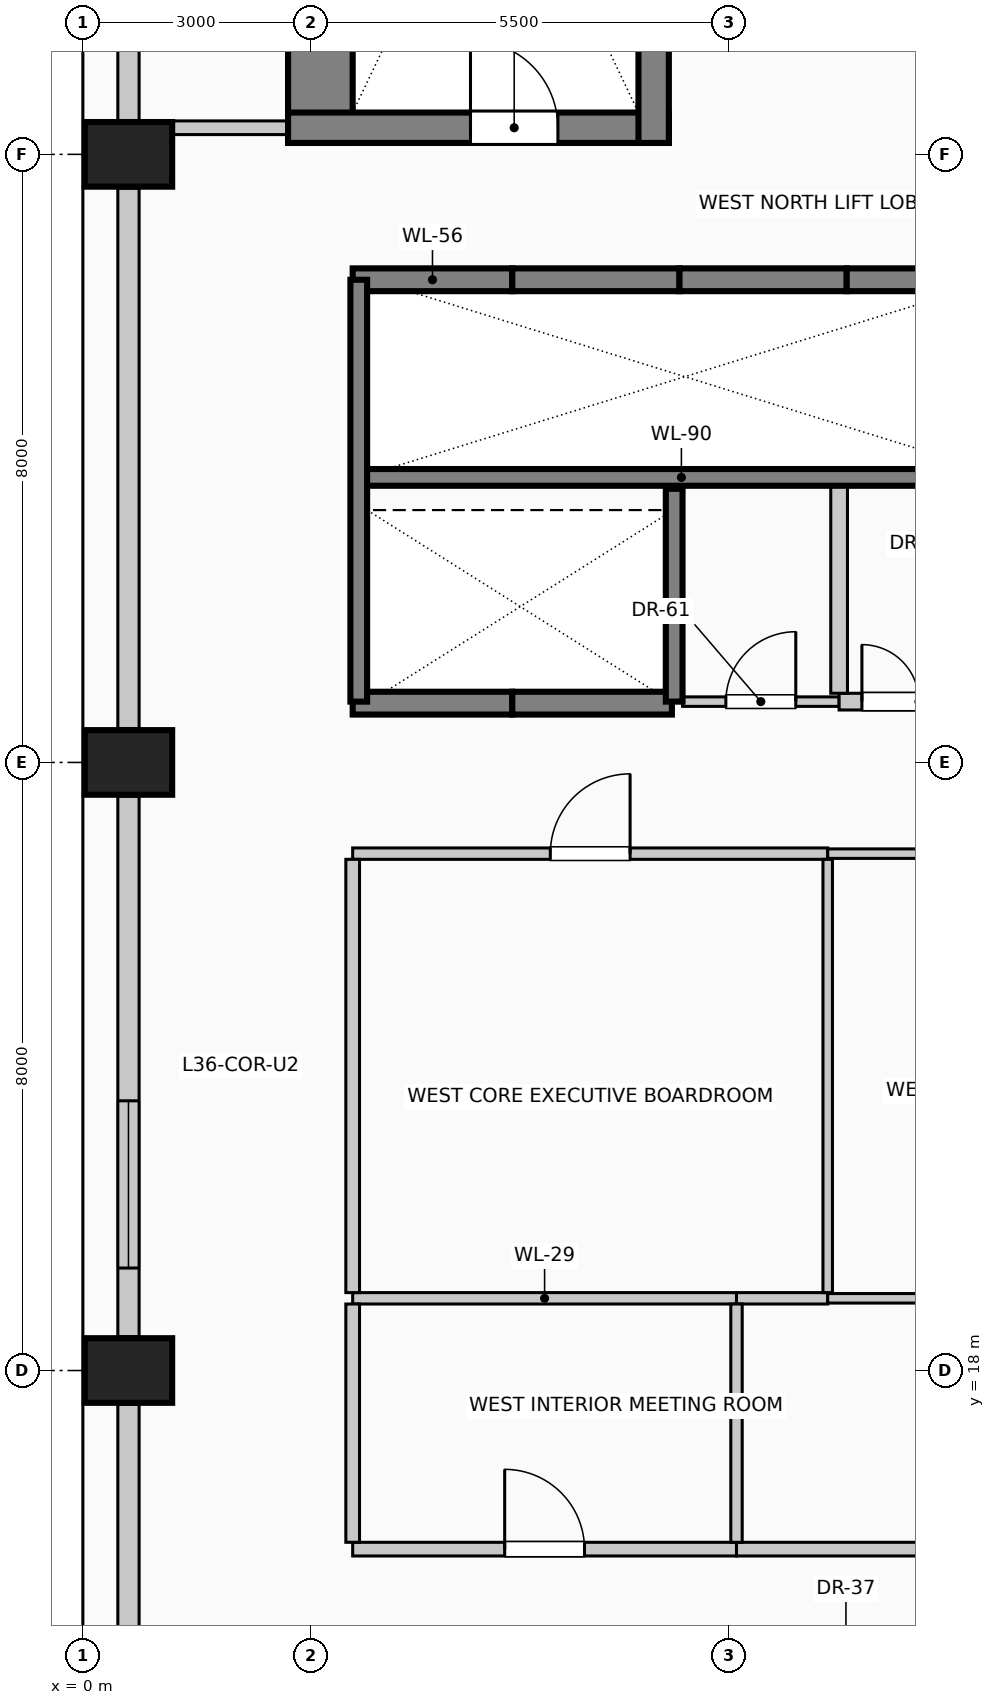
"""IFC4 building model, lengths in metres.
Left out: names, types, materials, properties, quantities, classifications, styles, units other than length and angle.
Written with IfcOpenShell. Run it as: python <this file> out.ifc"""

import sys

from ifc_helpers import new_model, si_unit, direction, frame, frame_2d, origin, origin_2d, place, context, subcontext, project, spatial, rectangle, extrude, element, fill, save


model = new_model("IFC4")
c1 = context("Model", 3, precision=1e-05, world=origin(), true_north=direction((0.0, 1.0)))
c2 = subcontext(c1, "Body", "Model", "MODEL_VIEW")
j1 = project(units=[si_unit("LENGTHUNIT", "METRE"), si_unit("PLANEANGLEUNIT", "RADIAN")], contexts=[c1])
p1 = place(None, origin())
s1 = spatial("IfcSite", under=j1, at=p1, CompositionType="ELEMENT")
p2 = place(p1, origin())
s2 = spatial("IfcBuilding", under=s1, at=p2, CompositionType="ELEMENT")
p3 = place(p2, frame((0.0, 0.0, 148.6)))
s3 = spatial("IfcBuildingStorey", under=s2, at=p3, CompositionType="ELEMENT", Elevation=148.6)
p4 = place(p3, frame((3.125, 34.15, 0.0), z_axis=(0.0, 0.0, 1.0), x_axis=(0.0, 1.0, 0.0)))
e1 = element("IfcWall", 1, at=p4, inside=s3, PredefinedType="SHEAR", context=c2, shape_type="SweptSolid", body=[
    extrude(rectangle(XDim=9.13, YDim=0.85, at=frame_2d((4.565, 0.0))), origin(), (0.0, 0.0, 1.0), 4.0),
])
p5 = place(p3, frame((2.7, 34.35, 0.0), z_axis=(0.0, 0.0, 1.0), x_axis=(1.0, 0.0, 0.0)))
e2 = element("IfcWall", 2, at=p5, inside=s3, PredefinedType="SHEAR", context=c2, shape_type="SweptSolid", body=[
    extrude(rectangle(XDim=5.01, YDim=0.4, at=frame_2d((2.505, 0.0))), origin(), (0.0, 0.0, 1.0), 4.0),
])
p6 = place(p5, frame((2.4, 0.0, 0.0)))
e3 = element("IfcOpeningElement", 3, at=p6, cuts=e2, PredefinedType="OPENING", context=c2, shape_type="SweptSolid", body=[
    extrude(rectangle(XDim=1.15, YDim=2.2, at=frame_2d((0.575, 1.1))), frame((0.0, 0.21, 0.0), z_axis=(0.0, -1.0, 0.0), x_axis=(1.0, 0.0, 0.0)), (0.0, 0.0, 1.0), 0.42),
])
p7 = place(p3, frame((7.51, 34.15, 0.0), z_axis=(0.0, 0.0, 1.0), x_axis=(0.0, 1.0, 0.0)))
e4 = element("IfcWall", 4, at=p7, inside=s3, PredefinedType="SHEAR", context=c2, shape_type="SweptSolid", body=[
    extrude(rectangle(XDim=9.13, YDim=0.4, at=frame_2d((4.565, 0.0))), origin(), (0.0, 0.0, 1.0), 4.0),
])
for number, where, z_axis, x_axis in (
    (5, (0.6, 18.0, 0.0), (0.0, 0.0, 1.0), (0.0, 1.0, 0.0)),
    (6, (0.6, 26.0, 0.0), (0.0, 0.0, 1.0), (0.0, 1.0, 0.0)),
    (7, (0.6, 34.0, 0.0), (0.0, 0.0, 1.0), (0.0, 1.0, 0.0)),
):
    element("IfcColumn", number, at=place(p3, frame(where, z_axis=z_axis, x_axis=x_axis)), inside=s3, PredefinedType="COLUMN", context=c2, shape_type="SweptSolid", body=[
        extrude(rectangle(XDim=0.85, YDim=1.15, at=origin_2d()), origin(), (0.0, 0.0, 1.0), 4.0),
    ])
p8 = place(p3, frame((0.6, 10.445, 0.0), z_axis=(0.0, 0.0, 1.0), x_axis=(0.0, 1.0, 0.0)))
e8 = element("IfcWall", 8, at=p8, inside=s3, PredefinedType="SOLIDWALL", context=c2, shape_type="SweptSolid", body=[
    extrude(rectangle(XDim=7.11, YDim=0.28, at=frame_2d((3.555, 0.0))), origin(), (0.0, 0.0, 1.0), 2.875),
])
p9 = place(p3, frame((0.6, 18.445, 0.0), z_axis=(0.0, 0.0, 1.0), x_axis=(0.0, 1.0, 0.0)))
e9 = element("IfcWall", 9, at=p9, inside=s3, PredefinedType="SOLIDWALL", context=c2, shape_type="SweptSolid", body=[
    extrude(rectangle(XDim=7.11, YDim=0.28, at=frame_2d((3.555, 0.0))), origin(), (0.0, 0.0, 1.0), 2.875),
])
p10 = place(p9, frame((0.903, 0.0, 0.5)))
e10 = element("IfcOpeningElement", 10, at=p10, cuts=e9, PredefinedType="OPENING", context=c2, shape_type="SweptSolid", body=[
    extrude(rectangle(XDim=2.2, YDim=1.95, at=frame_2d((1.1, 0.975))), frame((0.0, 0.15, 0.0), z_axis=(0.0, -1.0, 0.0), x_axis=(1.0, 0.0, 0.0)), (0.0, 0.0, 1.0), 0.3),
])
p11 = place(p3, frame((0.6, 26.445, 0.0), z_axis=(0.0, 0.0, 1.0), x_axis=(0.0, 1.0, 0.0)))
e11 = element("IfcWall", 11, at=p11, inside=s3, PredefinedType="SOLIDWALL", context=c2, shape_type="SweptSolid", body=[
    extrude(rectangle(XDim=7.11, YDim=0.28, at=frame_2d((3.555, 0.0))), origin(), (0.0, 0.0, 1.0), 2.875),
])
p12 = place(p3, frame((0.6, 34.445, 0.0), z_axis=(0.0, 0.0, 1.0), x_axis=(0.0, 1.0, 0.0)))
e12 = element("IfcWall", 12, at=p12, inside=s3, PredefinedType="SOLIDWALL", context=c2, shape_type="SweptSolid", body=[
    extrude(rectangle(XDim=7.51, YDim=0.28, at=frame_2d((3.755, 0.0))), origin(), (0.0, 0.0, 1.0), 2.875),
])
p13 = place(p3, frame((3.55, 32.35, 0.0), z_axis=(0.0, 0.0, 1.0), x_axis=(1.0, 0.0, 0.0)))
e13 = element("IfcWall", 13, at=p13, inside=s3, PredefinedType="SOLIDWALL", context=c2, shape_type="SweptSolid", body=[
    extrude(rectangle(XDim=2.1, YDim=0.3, at=frame_2d((1.05, 0.0))), origin(), (0.0, 0.0, 1.0), 4.0),
])
p14 = place(p3, frame((5.65, 32.35, 0.0), z_axis=(0.0, 0.0, 1.0), x_axis=(1.0, 0.0, 0.0)))
e14 = element("IfcWall", 14, at=p14, inside=s3, PredefinedType="SOLIDWALL", context=c2, shape_type="SweptSolid", body=[
    extrude(rectangle(XDim=2.2, YDim=0.3, at=frame_2d((1.1, 0.0))), origin(), (0.0, 0.0, 1.0), 4.0),
])
p15 = place(p3, frame((7.85, 32.35, 0.0), z_axis=(0.0, 0.0, 1.0), x_axis=(1.0, 0.0, 0.0)))
e15 = element("IfcWall", 15, at=p15, inside=s3, PredefinedType="SOLIDWALL", context=c2, shape_type="SweptSolid", body=[
    extrude(rectangle(XDim=2.2, YDim=0.3, at=frame_2d((1.1, 0.0))), origin(), (0.0, 0.0, 1.0), 4.0),
])
p16 = place(p3, frame((10.05, 32.35, 0.0), z_axis=(0.0, 0.0, 1.0), x_axis=(1.0, 0.0, 0.0)))
e16 = element("IfcWall", 16, at=p16, inside=s3, PredefinedType="SOLIDWALL", context=c2, shape_type="SweptSolid", body=[
    extrude(rectangle(XDim=2.15, YDim=0.3, at=frame_2d((1.075, 0.0))), origin(), (0.0, 0.0, 1.0), 4.0),
])
p17 = place(p3, frame((5.65, 26.78, 0.0), z_axis=(0.0, 0.0, 1.0), x_axis=(-1.0, 0.0, 0.0)))
e17 = element("IfcWall", 17, at=p17, inside=s3, PredefinedType="SOLIDWALL", context=c2, shape_type="SweptSolid", body=[
    extrude(rectangle(XDim=2.1, YDim=0.3, at=frame_2d((1.05, 0.0))), origin(), (0.0, 0.0, 1.0), 4.0),
])
p18 = place(p3, frame((7.75, 26.78, 0.0), z_axis=(0.0, 0.0, 1.0), x_axis=(-1.0, 0.0, 0.0)))
e18 = element("IfcWall", 18, at=p18, inside=s3, PredefinedType="SOLIDWALL", context=c2, shape_type="SweptSolid", body=[
    extrude(rectangle(XDim=2.1, YDim=0.3, at=frame_2d((1.05, 0.0))), origin(), (0.0, 0.0, 1.0), 4.0),
])
p19 = place(p3, frame((3.55, 29.75, 0.0), z_axis=(0.0, 0.0, 1.0), x_axis=(1.0, 0.0, 0.0)))
e19 = element("IfcWall", 19, at=p19, inside=s3, PredefinedType="SOLIDWALL", context=c2, shape_type="SweptSolid", body=[
    extrude(rectangle(XDim=8.65, YDim=0.22, at=frame_2d((4.325, 0.0))), origin(), (0.0, 0.0, 1.0), 4.0),
])
p20 = place(p3, frame((3.63, 26.8, 0.0), z_axis=(0.0, 0.0, 1.0), x_axis=(0.0, 1.0, 0.0)))
e20 = element("IfcWall", 20, at=p20, inside=s3, PredefinedType="SOLIDWALL", context=c2, shape_type="SweptSolid", body=[
    extrude(rectangle(XDim=5.55, YDim=0.22, at=frame_2d((2.775, 0.0))), origin(), (0.0, 0.0, 1.0), 4.0),
])
p21 = place(p3, frame((7.78, 26.8, 0.0), z_axis=(0.0, 0.0, 1.0), x_axis=(0.0, 1.0, 0.0)))
e21 = element("IfcWall", 21, at=p21, inside=s3, PredefinedType="SOLIDWALL", context=c2, shape_type="SweptSolid", body=[
    extrude(rectangle(XDim=2.8, YDim=0.22, at=frame_2d((1.4, 0.0))), origin(), (0.0, 0.0, 1.0), 4.0),
])
p22 = place(p3, frame((3.55, 15.65, 0.0), z_axis=(0.0, 0.0, 1.0), x_axis=(1.0, 0.0, 0.0)))
e22 = element("IfcWall", 22, at=p22, inside=s3, PredefinedType="PARTITIONING", context=c2, shape_type="SweptSolid", body=[
    extrude(rectangle(XDim=5.05, YDim=0.18, at=frame_2d((2.525, 0.0))), origin(), (0.0, 0.0, 1.0), 3.725),
])
p23 = place(p22, frame((2.0, 0.0, 0.0)))
e23 = element("IfcOpeningElement", 23, at=p23, cuts=e22, PredefinedType="OPENING", context=c2, shape_type="SweptSolid", body=[
    extrude(rectangle(XDim=1.05, YDim=2.15, at=frame_2d((0.525, 1.075))), frame((0.0, 0.1, 0.0), z_axis=(0.0, -1.0, 0.0), x_axis=(1.0, 0.0, 0.0)), (0.0, 0.0, 1.0), 0.2),
])
p24 = place(p3, frame((8.6, 15.65, 0.0), z_axis=(0.0, 0.0, 1.0), x_axis=(1.0, 0.0, 0.0)))
e24 = element("IfcWall", 24, at=p24, inside=s3, PredefinedType="PARTITIONING", context=c2, shape_type="SweptSolid", body=[
    extrude(rectangle(XDim=7.25, YDim=0.18, at=frame_2d((3.625, 0.0))), origin(), (0.0, 0.0, 1.0), 3.725),
])
p25 = place(p24, frame((3.15, 0.0, 0.0)))
e25 = element("IfcOpeningElement", 25, at=p25, cuts=e24, PredefinedType="OPENING", context=c2, shape_type="SweptSolid", body=[
    extrude(rectangle(XDim=0.95, YDim=2.15, at=frame_2d((0.475, 1.075))), frame((0.0, 0.1, 0.0), z_axis=(0.0, -1.0, 0.0), x_axis=(1.0, 0.0, 0.0)), (0.0, 0.0, 1.0), 0.2),
])
p26 = place(p3, frame((3.55, 18.95, 0.0), z_axis=(0.0, 0.0, 1.0), x_axis=(1.0, 0.0, 0.0)))
e26 = element("IfcWall", 26, at=p26, inside=s3, PredefinedType="PARTITIONING", context=c2, shape_type="SweptSolid", body=[
    extrude(rectangle(XDim=5.05, YDim=0.15, at=frame_2d((2.525, 0.0))), origin(), (0.0, 0.0, 1.0), 3.725),
])
p27 = place(p3, frame((8.6, 18.95, 0.0), z_axis=(0.0, 0.0, 1.0), x_axis=(1.0, 0.0, 0.0)))
e27 = element("IfcWall", 27, at=p27, inside=s3, PredefinedType="PARTITIONING", context=c2, shape_type="SweptSolid", body=[
    extrude(rectangle(XDim=1.2, YDim=0.15, at=frame_2d((0.6, 0.0))), origin(), (0.0, 0.0, 1.0), 3.725),
])
p28 = place(p3, frame((9.8, 18.95, 0.0), z_axis=(0.0, 0.0, 1.0), x_axis=(1.0, 0.0, 0.0)))
e28 = element("IfcWall", 28, at=p28, inside=s3, PredefinedType="PARTITIONING", context=c2, shape_type="SweptSolid", body=[
    extrude(rectangle(XDim=6.05, YDim=0.125, at=frame_2d((3.025, 0.0))), origin(), (0.0, 0.0, 1.0), 3.725),
])
p29 = place(p3, frame((3.55, 24.8, 0.0), z_axis=(0.0, 0.0, 1.0), x_axis=(1.0, 0.0, 0.0)))
e29 = element("IfcWall", 29, at=p29, inside=s3, PredefinedType="PARTITIONING", context=c2, shape_type="SweptSolid", body=[
    extrude(rectangle(XDim=6.25, YDim=0.15, at=frame_2d((3.125, 0.0))), origin(), (0.0, 0.0, 1.0), 3.725),
])
p30 = place(p29, frame((2.6, 0.0, 0.0)))
e30 = element("IfcOpeningElement", 30, at=p30, cuts=e29, PredefinedType="OPENING", context=c2, shape_type="SweptSolid", body=[
    extrude(rectangle(XDim=1.05, YDim=2.15, at=frame_2d((0.525, 1.075))), frame((0.0, 0.085, 0.0), z_axis=(0.0, -1.0, 0.0), x_axis=(1.0, 0.0, 0.0)), (0.0, 0.0, 1.0), 0.17),
])
p31 = place(p3, frame((9.8, 24.8, 0.0), z_axis=(0.0, 0.0, 1.0), x_axis=(1.0, 0.0, 0.0)))
e31 = element("IfcWall", 31, at=p31, inside=s3, PredefinedType="PARTITIONING", context=c2, shape_type="SweptSolid", body=[
    extrude(rectangle(XDim=6.05, YDim=0.125, at=frame_2d((3.025, 0.0))), origin(), (0.0, 0.0, 1.0), 3.725),
])
p32 = place(p31, frame((2.575, 0.0, 0.0)))
e32 = element("IfcOpeningElement", 32, at=p32, cuts=e31, PredefinedType="OPENING", context=c2, shape_type="SweptSolid", body=[
    extrude(rectangle(XDim=0.9, YDim=2.1, at=frame_2d((0.45, 1.05))), frame((0.0, 0.073, 0.0), z_axis=(0.0, -1.0, 0.0), x_axis=(1.0, 0.0, 0.0)), (0.0, 0.0, 1.0), 0.145),
])
p33 = place(p3, frame((7.89, 26.8, 0.0), z_axis=(0.0, 0.0, 1.0), x_axis=(1.0, 0.0, 0.0)))
e33 = element("IfcWall", 33, at=p33, inside=s3, PredefinedType="PARTITIONING", context=c2, shape_type="SweptSolid", body=[
    extrude(rectangle(XDim=2.06, YDim=0.125, at=frame_2d((1.03, 0.0))), origin(), (0.0, 0.0, 1.0), 3.725),
])
p34 = place(p33, frame((0.57, 0.0, 0.0)))
e34 = element("IfcOpeningElement", 34, at=p34, cuts=e33, PredefinedType="OPENING", context=c2, shape_type="SweptSolid", body=[
    extrude(rectangle(XDim=0.92, YDim=2.1, at=frame_2d((0.46, 1.05))), frame((0.0, 0.073, 0.0), z_axis=(0.0, -1.0, 0.0), x_axis=(1.0, 0.0, 0.0)), (0.0, 0.0, 1.0), 0.145),
])
p35 = place(p3, frame((9.95, 26.8, 0.0), z_axis=(0.0, 0.0, 1.0), x_axis=(1.0, 0.0, 0.0)))
e35 = element("IfcWall", 35, at=p35, inside=s3, PredefinedType="PARTITIONING", context=c2, shape_type="SweptSolid", body=[
    extrude(rectangle(XDim=2.1, YDim=0.22, at=frame_2d((1.05, 0.0))), origin(), (0.0, 0.0, 1.0), 3.725),
])
p36 = place(p35, frame((0.3, 0.0, 0.0)))
e36 = element("IfcOpeningElement", 36, at=p36, cuts=e35, PredefinedType="OPENING", context=c2, shape_type="SweptSolid", body=[
    extrude(rectangle(XDim=1.5, YDim=2.25, at=frame_2d((0.75, 1.125))), frame((0.0, 0.12, 0.0), z_axis=(0.0, -1.0, 0.0), x_axis=(1.0, 0.0, 0.0)), (0.0, 0.0, 1.0), 0.24),
])
p37 = place(p3, frame((1.175, 34.35, 0.0), z_axis=(0.0, 0.0, 1.0), x_axis=(1.0, 0.0, 0.0)))
e37 = element("IfcWall", 37, at=p37, inside=s3, PredefinedType="PARTITIONING", context=c2, shape_type="SweptSolid", body=[
    extrude(rectangle(XDim=1.525, YDim=0.18, at=frame_2d((0.762, 0.0))), origin(), (0.0, 0.0, 1.0), 3.725),
])
p38 = place(p3, frame((3.55, 15.74, 0.0), z_axis=(0.0, 0.0, 1.0), x_axis=(0.0, 1.0, 0.0)))
e38 = element("IfcWall", 38, at=p38, inside=s3, PredefinedType="PARTITIONING", context=c2, shape_type="SweptSolid", body=[
    extrude(rectangle(XDim=3.135, YDim=0.18, at=frame_2d((1.567, 0.0))), origin(), (0.0, 0.0, 1.0), 3.725),
])
p39 = place(p3, frame((3.55, 19.025, 0.0), z_axis=(0.0, 0.0, 1.0), x_axis=(0.0, 1.0, 0.0)))
e39 = element("IfcWall", 39, at=p39, inside=s3, PredefinedType="PARTITIONING", context=c2, shape_type="SweptSolid", body=[
    extrude(rectangle(XDim=5.7, YDim=0.18, at=frame_2d((2.85, 0.0))), origin(), (0.0, 0.0, 1.0), 3.725),
])
p40 = place(p3, frame((8.6, 15.74, 0.0), z_axis=(0.0, 0.0, 1.0), x_axis=(0.0, 1.0, 0.0)))
e40 = element("IfcWall", 40, at=p40, inside=s3, PredefinedType="PARTITIONING", context=c2, shape_type="SweptSolid", body=[
    extrude(rectangle(XDim=3.135, YDim=0.15, at=frame_2d((1.567, 0.0))), origin(), (0.0, 0.0, 1.0), 3.725),
])
p41 = place(p3, frame((9.8, 19.025, 0.0), z_axis=(0.0, 0.0, 1.0), x_axis=(0.0, 1.0, 0.0)))
e41 = element("IfcWall", 41, at=p41, inside=s3, PredefinedType="PARTITIONING", context=c2, shape_type="SweptSolid", body=[
    extrude(rectangle(XDim=5.7, YDim=0.125, at=frame_2d((2.85, 0.0))), origin(), (0.0, 0.0, 1.0), 3.725),
])
p42 = place(p3, frame((9.95, 26.91, 0.0), z_axis=(0.0, 0.0, 1.0), x_axis=(0.0, 1.0, 0.0)))
e42 = element("IfcWall", 42, at=p42, inside=s3, PredefinedType="PARTITIONING", context=c2, shape_type="SweptSolid", body=[
    extrude(rectangle(XDim=2.73, YDim=0.22, at=frame_2d((1.365, 0.0))), origin(), (0.0, 0.0, 1.0), 3.725),
])
p43 = place(p10, origin())
e43 = element("IfcWindow", 43, at=p43, inside=s3, PartitioningType="SINGLE_PANEL", PredefinedType="WINDOW", context=c2, shape_type="SweptSolid", body=[
    extrude(rectangle(XDim=2.2, YDim=1.95, at=frame_2d((1.1, 0.975))), frame((0.0, 0.03, 0.0), z_axis=(0.0, -1.0, 0.0), x_axis=(1.0, 0.0, 0.0)), (0.0, 0.0, 1.0), 0.06),
])
fill(e10, e43)
p44 = place(p6, origin())
e44 = element("IfcDoor", 44, at=p44, inside=s3, OperationType="SINGLE_SWING_LEFT", PredefinedType="DOOR", context=c2, shape_type="SweptSolid", body=[
    extrude(rectangle(XDim=1.15, YDim=2.2, at=frame_2d((0.575, 1.1))), frame((0.0, 0.025, 0.0), z_axis=(0.0, -1.0, 0.0), x_axis=(1.0, 0.0, 0.0)), (0.0, 0.0, 1.0), 0.05),
])
fill(e3, e44)
p45 = place(p23, origin())
e45 = element("IfcDoor", 45, at=p45, inside=s3, OperationType="SINGLE_SWING_LEFT", PredefinedType="DOOR", context=c2, shape_type="SweptSolid", body=[
    extrude(rectangle(XDim=1.05, YDim=2.15, at=frame_2d((0.525, 1.075))), frame((0.0, 0.025, 0.0), z_axis=(0.0, -1.0, 0.0), x_axis=(1.0, 0.0, 0.0)), (0.0, 0.0, 1.0), 0.05),
])
fill(e23, e45)
p46 = place(p30, origin())
e46 = element("IfcDoor", 46, at=p46, inside=s3, OperationType="SINGLE_SWING_RIGHT", PredefinedType="DOOR", context=c2, shape_type="SweptSolid", body=[
    extrude(rectangle(XDim=1.05, YDim=2.15, at=frame_2d((0.525, 1.075))), frame((0.0, 0.025, 0.0), z_axis=(0.0, -1.0, 0.0), x_axis=(1.0, 0.0, 0.0)), (0.0, 0.0, 1.0), 0.05),
])
fill(e30, e46)
p47 = place(p34, origin())
e47 = element("IfcDoor", 47, at=p47, inside=s3, OperationType="SINGLE_SWING_RIGHT", PredefinedType="DOOR", context=c2, shape_type="SweptSolid", body=[
    extrude(rectangle(XDim=0.92, YDim=2.1, at=frame_2d((0.46, 1.05))), frame((0.0, 0.025, 0.0), z_axis=(0.0, -1.0, 0.0), x_axis=(1.0, 0.0, 0.0)), (0.0, 0.0, 1.0), 0.05),
])
fill(e34, e47)
p48 = place(p36, origin())
e48 = element("IfcDoor", 48, at=p48, inside=s3, OperationType="DOUBLE_DOOR_SINGLE_SWING", PredefinedType="DOOR", context=c2, shape_type="SweptSolid", body=[
    extrude(rectangle(XDim=1.5, YDim=2.25, at=frame_2d((0.75, 1.125))), frame((0.0, 0.025, 0.0), z_axis=(0.0, -1.0, 0.0), x_axis=(1.0, 0.0, 0.0)), (0.0, 0.0, 1.0), 0.05),
])
fill(e36, e48)
save(model, sys.argv[1])
